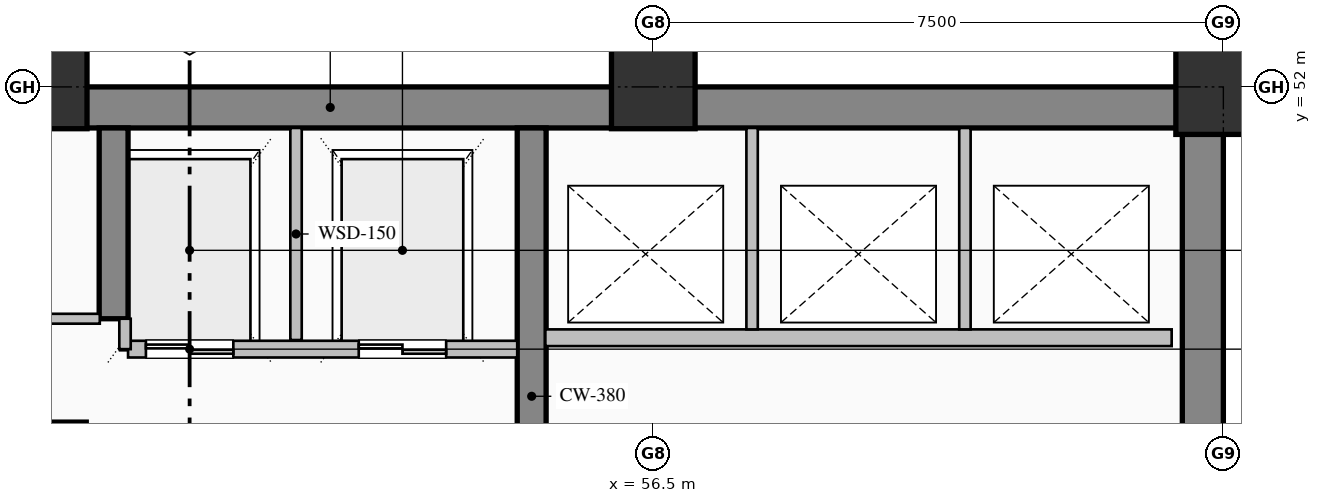
"""IFC4 building model, lengths in metres.
Left out: names, types, materials, properties, quantities, classifications, styles, units other than length and angle.
Written with IfcOpenShell. Run it as: python <this file> out.ifc"""

import sys

from ifc_helpers import new_model, si_unit, direction, frame, frame_2d, origin, origin_2d, place, context, subcontext, project, spatial, rectangle, hollow_rectangle, extrude, element, fill, save


model = new_model("IFC4")
c1 = context("Model", 3, precision=1e-05, world=origin(), true_north=direction((0.0, 1.0)))
c2 = subcontext(c1, "Body", "Model", "MODEL_VIEW")
j1 = project(units=[si_unit("LENGTHUNIT", "METRE"), si_unit("PLANEANGLEUNIT", "RADIAN")], contexts=[c1])
p1 = place(None, origin())
s1 = spatial("IfcSite", under=j1, at=p1, CompositionType="ELEMENT")
p2 = place(p1, origin())
s2 = spatial("IfcBuilding", under=s1, at=p2, CompositionType="ELEMENT")
p3 = place(p2, frame((0.0, 0.0, 36.2)))
s3 = spatial("IfcBuildingStorey", under=s2, at=p3, CompositionType="ELEMENT", Elevation=36.2)
p4 = place(p3, frame((40.5, 51.73, 0.0), z_axis=(0.0, 0.0, 1.0), x_axis=(1.0, 0.0, 0.0)))
e1 = element("IfcWall", 1, at=p4, inside=s3, PredefinedType="SHEAR", context=c2, shape_type="SweptSolid", body=[
    extrude(rectangle(XDim=23.5, YDim=0.54, at=frame_2d((11.75, 0.0))), origin(), (0.0, 0.0, 1.0), 3.75),
])
p5 = place(p3, frame((63.73, 36.32, 0.0), z_axis=(0.0, 0.0, 1.0), x_axis=(0.0, 1.0, 0.0)))
e2 = element("IfcWall", 2, at=p5, inside=s3, PredefinedType="SHEAR", context=c2, shape_type="SweptSolid", body=[
    extrude(rectangle(XDim=15.14, YDim=0.54, at=frame_2d((7.57, 0.0))), origin(), (0.0, 0.0, 1.0), 3.75),
])
p6 = place(p3, frame((49.4, 48.95, 0.0), z_axis=(0.0, 0.0, 1.0), x_axis=(0.0, 1.0, 0.0)))
e3 = element("IfcWall", 3, at=p6, inside=s3, PredefinedType="SHEAR", context=c2, shape_type="SweptSolid", body=[
    extrude(rectangle(XDim=2.51, YDim=0.38, at=frame_2d((1.255, 0.0))), origin(), (0.0, 0.0, 1.0), 3.75),
])
p7 = place(p3, frame((54.9, 44.4, 0.0), z_axis=(0.0, 0.0, 1.0), x_axis=(0.0, 1.0, 0.0)))
e4 = element("IfcWall", 4, at=p7, inside=s3, PredefinedType="SHEAR", context=c2, shape_type="SweptSolid", body=[
    extrude(rectangle(XDim=7.06, YDim=0.38, at=frame_2d((3.53, 0.0))), origin(), (0.0, 0.0, 1.0), 3.75),
])
for number, where, z_axis, x_axis in (
    (5, (48.5, 52.0, 0.0), (0.0, 0.0, 1.0), (1.0, 0.0, 0.0)),
    (6, (56.5, 52.0, 0.0), (0.0, 0.0, 1.0), (1.0, 0.0, 0.0)),
):
    element("IfcColumn", number, at=place(p3, frame(where, z_axis=z_axis, x_axis=x_axis)), inside=s3, PredefinedType="COLUMN", context=c2, shape_type="SweptSolid", body=[
        extrude(hollow_rectangle(XDim=1.1, YDim=1.1, WallThickness=0.04, at=origin_2d()), origin(), (0.0, 0.0, 1.0), 4.0),
    ])
p8 = place(p3, frame((64.0, 52.0, 0.0), z_axis=(0.0, 0.0, 1.0), x_axis=(1.0, 0.0, 0.0)))
e7 = element("IfcColumn", 7, at=p8, inside=s3, PredefinedType="COLUMN", context=c2, shape_type="SweptSolid", body=[
    extrude(hollow_rectangle(XDim=1.25, YDim=1.25, WallThickness=0.045, at=origin_2d()), origin(), (0.0, 0.0, 1.0), 4.0),
])
p9 = place(p3, frame((40.96, 47.47, 0.0), z_axis=(0.0, 0.0, 1.0), x_axis=(1.0, 0.0, 0.0)))
e8 = element("IfcWall", 8, at=p9, inside=s3, PredefinedType="SOLIDWALL", context=c2, shape_type="SweptSolid", body=[
    extrude(rectangle(XDim=8.08, YDim=0.24, at=frame_2d((4.04, 0.0))), origin(), (0.0, 0.0, 1.0), 4.0),
])
p10 = place(p3, frame((54.71, 48.55, 0.0), z_axis=(0.0, 0.0, 1.0), x_axis=(-1.0, 0.0, 0.0)))
e9 = element("IfcWall", 9, at=p10, inside=s3, PredefinedType="PARTITIONING", context=c2, shape_type="SweptSolid", body=[
    extrude(rectangle(XDim=5.12, YDim=0.22, at=frame_2d((2.56, 0.0))), origin(), (0.0, 0.0, 1.0), 3.75),
])
p11 = place(p10, frame((3.735, 0.0, 0.0)))
e10 = element("IfcOpeningElement", 10, at=p11, cuts=e9, PredefinedType="OPENING", context=c2, shape_type="SweptSolid", body=[
    extrude(rectangle(XDim=1.15, YDim=2.2, at=frame_2d((0.575, 1.1))), frame((0.0, 0.12, 0.0), z_axis=(0.0, -1.0, 0.0), x_axis=(1.0, 0.0, 0.0)), (0.0, 0.0, 1.0), 0.24),
])
p12 = place(p10, frame((0.935, 0.0, 0.0)))
e11 = element("IfcOpeningElement", 11, at=p12, cuts=e9, PredefinedType="OPENING", context=c2, shape_type="SweptSolid", body=[
    extrude(rectangle(XDim=1.15, YDim=2.2, at=frame_2d((0.575, 1.1))), frame((0.0, 0.12, 0.0), z_axis=(0.0, -1.0, 0.0), x_axis=(1.0, 0.0, 0.0)), (0.0, 0.0, 1.0), 0.24),
])
p13 = place(p3, frame((51.8, 48.67, 0.0), z_axis=(0.0, 0.0, 1.0), x_axis=(0.0, 1.0, 0.0)))
e12 = element("IfcWall", 12, at=p13, inside=s3, PredefinedType="PARTITIONING", context=c2, shape_type="SweptSolid", body=[
    extrude(rectangle(XDim=2.79, YDim=0.15, at=frame_2d((1.395, 0.0))), origin(), (0.0, 0.0, 1.0), 3.75),
])
p14 = place(p3, frame((49.55, 48.55, 0.0), z_axis=(0.0, 0.0, 1.0), x_axis=(0.0, 1.0, 0.0)))
e13 = element("IfcWall", 13, at=p14, inside=s3, PredefinedType="PARTITIONING", context=c2, shape_type="SweptSolid", body=[
    extrude(rectangle(XDim=0.4, YDim=0.15, at=frame_2d((0.2, 0.0))), origin(), (0.0, 0.0, 1.0), 3.75),
])
p15 = place(p3, frame((63.32, 48.7, 0.0), z_axis=(0.0, 0.0, 1.0), x_axis=(-1.0, 0.0, 0.0)))
e14 = element("IfcWall", 14, at=p15, inside=s3, PredefinedType="PARTITIONING", context=c2, shape_type="SweptSolid", body=[
    extrude(rectangle(XDim=8.24, YDim=0.22, at=frame_2d((4.12, 0.0))), origin(), (0.0, 0.0, 1.0), 3.75),
])
for number, where, z_axis, x_axis in (
    (15, (57.8, 48.81, 0.0), (0.0, 0.0, 1.0), (0.0, 1.0, 0.0)),
    (16, (60.6, 48.81, 0.0), (0.0, 0.0, 1.0), (0.0, 1.0, 0.0)),
):
    element("IfcWall", number, at=place(p3, frame(where, z_axis=z_axis, x_axis=x_axis)), inside=s3, PredefinedType="PARTITIONING", context=c2, shape_type="SweptSolid", body=[
        extrude(rectangle(XDim=2.65, YDim=0.15, at=frame_2d((1.325, 0.0))), origin(), (0.0, 0.0, 1.0), 3.75),
    ])
p16 = place(p3, frame((45.2, 48.95, 0.0), z_axis=(0.0, 0.0, 1.0), x_axis=(1.0, 0.0, 0.0)))
e17 = element("IfcWall", 17, at=p16, inside=s3, PredefinedType="PARTITIONING", context=c2, shape_type="SweptSolid", body=[
    extrude(rectangle(XDim=4.018, YDim=0.13, at=frame_2d((2.009, 0.0))), origin(), (0.0, 0.0, 1.0), 3.75),
])
p17 = place(p16, frame((1.549, 0.0, 0.0)))
e18 = element("IfcOpeningElement", 18, at=p17, cuts=e17, PredefinedType="OPENING", context=c2, shape_type="SweptSolid", body=[
    extrude(rectangle(XDim=0.92, YDim=2.15, at=frame_2d((0.46, 1.075))), frame((0.0, 0.075, 0.0), z_axis=(0.0, -1.0, 0.0), x_axis=(1.0, 0.0, 0.0)), (0.0, 0.0, 1.0), 0.15),
])
p18 = place(p11, origin())
e19 = element("IfcDoor", 19, at=p18, inside=s3, OperationType="DOUBLE_DOOR_SLIDING", PredefinedType="DOOR", context=c2, shape_type="SweptSolid", body=[
    extrude(rectangle(XDim=1.15, YDim=2.2, at=frame_2d((0.575, 1.1))), frame((0.0, 0.025, 0.0), z_axis=(0.0, -1.0, 0.0), x_axis=(1.0, 0.0, 0.0)), (0.0, 0.0, 1.0), 0.05),
])
fill(e10, e19)
p19 = place(p12, origin())
e20 = element("IfcDoor", 20, at=p19, inside=s3, OperationType="DOUBLE_DOOR_SLIDING", PredefinedType="DOOR", context=c2, shape_type="SweptSolid", body=[
    extrude(rectangle(XDim=1.15, YDim=2.2, at=frame_2d((0.575, 1.1))), frame((0.0, 0.025, 0.0), z_axis=(0.0, -1.0, 0.0), x_axis=(1.0, 0.0, 0.0)), (0.0, 0.0, 1.0), 0.05),
])
fill(e11, e20)
save(model, sys.argv[1])
